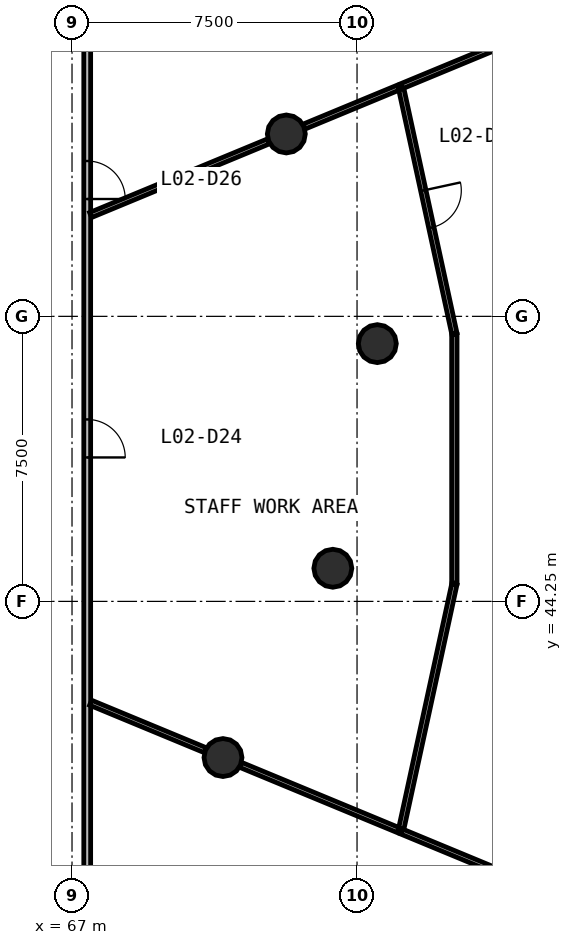
"""IFC4 building model, lengths in metres.
Left out: names, types, materials, properties, quantities, classifications, styles, units other than length and angle.
Written with IfcOpenShell. Run it as: python <this file> out.ifc"""

import sys

from ifc_helpers import new_model, si_unit, direction, frame, frame_2d, origin, origin_2d, place, context, subcontext, project, spatial, rectangle, circle, extrude, source, transform, mapped, element, fill, save


model = new_model("IFC4")
c1 = context("Model", 3, precision=1e-05, world=origin(), true_north=direction((0.0, 1.0)))
c2 = subcontext(c1, "Body", "Model", "MODEL_VIEW")
j1 = project(units=[si_unit("LENGTHUNIT", "METRE"), si_unit("PLANEANGLEUNIT", "RADIAN")], contexts=[c1])
p1 = place(None, origin())
s1 = spatial("IfcSite", under=j1, at=p1, CompositionType="ELEMENT")
p2 = place(p1, origin())
s2 = spatial("IfcBuilding", under=s1, at=p2, CompositionType="ELEMENT")
p3 = place(p2, frame((0.0, 0.0, 9.4)))
s3 = spatial("IfcBuildingStorey", under=s2, at=p3, CompositionType="ELEMENT", Elevation=9.4)
m1 = source(origin(), c2, "Body", "SweptSolid", [
    extrude(circle(Radius=0.5, at=origin_2d()), origin(), (0.0, 0.0, 1.0), 4.4),
])
for number, where, z_axis, x_axis in (
    (1, (75.034, 51.032, 0.0), (0.0, 0.0, 1.0), (1.0, 0.0, 0.0)),
    (2, (72.639, 56.549, 0.0), (0.0, 0.0, 1.0), (1.0, 0.0, 0.0)),
    (3, (70.972, 40.141, 0.0), (0.0, 0.0, 1.0), (1.0, 0.0, 0.0)),
    (4, (73.863, 45.122, 0.0), (0.0, 0.0, 1.0), (1.0, 0.0, 0.0)),
):
    element("IfcColumn", number, at=place(p3, frame(where, z_axis=z_axis, x_axis=x_axis)), inside=s3, PredefinedType="COLUMN", context=c2, shape_type="MappedRepresentation", body=[
        mapped(m1, transform((0.0, 0.0, 0.0), scale=1.0)),
    ])
p4 = place(p3, frame((67.4, 60.37, 0.0), z_axis=(0.0, 0.0, 1.0), x_axis=(0.0, -1.0, 0.0)))
e5 = element("IfcWall", 5, at=p4, inside=s3, PredefinedType="PARTITIONING", context=c2, shape_type="SweptSolid", body=[
    extrude(rectangle(XDim=23.583, YDim=0.18, at=frame_2d((11.791, 0.0))), origin(), (0.0, 0.0, 1.0), 3.15),
])
p5 = place(p4, frame((11.333, 0.0, 0.0)))
e6 = element("IfcOpeningElement", 6, at=p5, cuts=e5, PredefinedType="OPENING", context=c2, shape_type="SweptSolid", body=[
    extrude(rectangle(XDim=1.0, YDim=2.1, at=frame_2d((0.5, 1.05))), frame((0.0, 0.1, 0.0), z_axis=(0.0, -1.0, 0.0), x_axis=(1.0, 0.0, 0.0)), (0.0, 0.0, 1.0), 0.2),
])
p6 = place(p4, frame((4.532, 0.0, 0.0)))
e7 = element("IfcOpeningElement", 7, at=p6, cuts=e5, PredefinedType="OPENING", context=c2, shape_type="SweptSolid", body=[
    extrude(rectangle(XDim=1.0, YDim=2.1, at=frame_2d((0.5, 1.05))), frame((0.0, 0.1, 0.0), z_axis=(0.0, -1.0, 0.0), x_axis=(1.0, 0.0, 0.0)), (0.0, 0.0, 1.0), 0.2),
])
p7 = place(p3, frame((75.65, 57.796, 0.0), z_axis=(0.0, 0.0, 1.0), x_axis=(0.212219247402, -0.977222078666, 0.0)))
e8 = element("IfcWall", 8, at=p7, inside=s3, PredefinedType="PARTITIONING", context=c2, shape_type="SweptSolid", body=[
    extrude(rectangle(XDim=6.648, YDim=0.14, at=frame_2d((3.324, 0.0))), origin(), (0.0, 0.0, 1.0), 3.15),
])
p8 = place(p7, frame((2.798, 0.0, 0.0)))
e9 = element("IfcOpeningElement", 9, at=p8, cuts=e8, PredefinedType="OPENING", context=c2, shape_type="SweptSolid", body=[
    extrude(rectangle(XDim=1.0, YDim=2.1, at=frame_2d((0.5, 1.05))), frame((0.0, 0.08, 0.0), z_axis=(0.0, -1.0, 0.0), x_axis=(1.0, 0.0, 0.0)), (0.0, 0.0, 1.0), 0.16),
])
p9 = place(p3, frame((75.65, 38.204, 0.0), z_axis=(0.0, 0.0, 1.0), x_axis=(0.212219247402, 0.977222078666, 0.0)))
e10 = element("IfcWall", 10, at=p9, inside=s3, PredefinedType="PARTITIONING", context=c2, shape_type="SweptSolid", body=[
    extrude(rectangle(XDim=6.648, YDim=0.14, at=frame_2d((3.324, 0.0))), origin(), (0.0, 0.0, 1.0), 3.15),
])
p10 = place(p3, frame((77.061, 44.731, 0.0), z_axis=(0.0, 0.0, 1.0), x_axis=(0.0, 1.0, 0.0)))
e11 = element("IfcWall", 11, at=p10, inside=s3, PredefinedType="PARTITIONING", context=c2, shape_type="SweptSolid", body=[
    extrude(rectangle(XDim=6.539, YDim=0.14, at=frame_2d((3.269, 0.0))), origin(), (0.0, 0.0, 1.0), 3.15),
])
p11 = place(p3, frame((75.677, 57.808, 0.0), z_axis=(0.0, 0.0, 1.0), x_axis=(0.923888996988, 0.382660582297, 0.0)))
e12 = element("IfcWall", 12, at=p11, inside=s3, PredefinedType="PARTITIONING", context=c2, shape_type="SweptSolid", body=[
    extrude(rectangle(XDim=5.935, YDim=0.14, at=frame_2d((2.968, 0.0))), origin(), (0.0, 0.0, 1.0), 3.15),
])
p12 = place(p3, frame((75.677, 38.192, 0.0), z_axis=(0.0, 0.0, 1.0), x_axis=(0.923874610175, -0.38269531572, 0.0)))
e13 = element("IfcWall", 13, at=p12, inside=s3, PredefinedType="PARTITIONING", context=c2, shape_type="SweptSolid", body=[
    extrude(rectangle(XDim=5.754, YDim=0.14, at=frame_2d((2.877, 0.0))), origin(), (0.0, 0.0, 1.0), 3.15),
])
p13 = place(p3, frame((67.49, 54.416, 0.0), z_axis=(0.0, 0.0, 1.0), x_axis=(0.923890025086, 0.382658100067, 0.0)))
e14 = element("IfcWall", 14, at=p13, inside=s3, PredefinedType="PARTITIONING", context=c2, shape_type="SweptSolid", body=[
    extrude(rectangle(XDim=5.068, YDim=0.14, at=frame_2d((2.534, 0.0))), origin(), (0.0, 0.0, 1.0), 3.15),
])
p14 = place(p3, frame((71.439, 39.948, 0.0), z_axis=(0.0, 0.0, 1.0), x_axis=(0.923881526718, -0.382678617888, 0.0)))
e15 = element("IfcWall", 15, at=p14, inside=s3, PredefinedType="PARTITIONING", context=c2, shape_type="SweptSolid", body=[
    extrude(rectangle(XDim=4.486, YDim=0.14, at=frame_2d((2.243, 0.0))), origin(), (0.0, 0.0, 1.0), 3.15),
])
p15 = place(p3, frame((67.49, 41.584, 0.0), z_axis=(0.0, 0.0, 1.0), x_axis=(0.923911109142, -0.382607190737, 0.0)))
e16 = element("IfcWall", 16, at=p15, inside=s3, PredefinedType="PARTITIONING", context=c2, shape_type="SweptSolid", body=[
    extrude(rectangle(XDim=3.264, YDim=0.14, at=frame_2d((1.632, 0.0))), origin(), (0.0, 0.0, 1.0), 3.15),
])
p16 = place(p3, frame((73.106, 56.742, 0.0), z_axis=(0.0, 0.0, 1.0), x_axis=(0.923855963606, 0.38274032778, 0.0)))
e17 = element("IfcWall", 17, at=p16, inside=s3, PredefinedType="PARTITIONING", context=c2, shape_type="SweptSolid", body=[
    extrude(rectangle(XDim=2.682, YDim=0.14, at=frame_2d((1.341, 0.0))), origin(), (0.0, 0.0, 1.0), 3.15),
])
m2 = source(origin(), c2, "Body", "SweptSolid", [
    extrude(rectangle(XDim=1.0, YDim=2.1, at=frame_2d((0.5, 1.05))), frame((0.0, 0.025, 0.0), z_axis=(0.0, -1.0, 0.0), x_axis=(1.0, 0.0, 0.0)), (0.0, 0.0, 1.0), 0.05),
])
p17 = place(p5, origin())
e18 = element("IfcDoor", 18, at=p17, inside=s3, OperationType="SINGLE_SWING_RIGHT", PredefinedType="DOOR", context=c2, shape_type="MappedRepresentation", body=[
    mapped(m2, transform((0.0, 0.0, 0.0), scale=1.0)),
])
fill(e6, e18)
p18 = place(p8, origin())
e19 = element("IfcDoor", 19, at=p18, inside=s3, OperationType="SINGLE_SWING_LEFT", PredefinedType="DOOR", context=c2, shape_type="MappedRepresentation", body=[
    mapped(m2, transform((0.0, 0.0, 0.0), scale=1.0)),
])
fill(e9, e19)
p19 = place(p6, origin())
e20 = element("IfcDoor", 20, at=p19, inside=s3, OperationType="SINGLE_SWING_RIGHT", PredefinedType="DOOR", context=c2, shape_type="MappedRepresentation", body=[
    mapped(m2, transform((0.0, 0.0, 0.0), scale=1.0)),
])
fill(e7, e20)
save(model, sys.argv[1])
